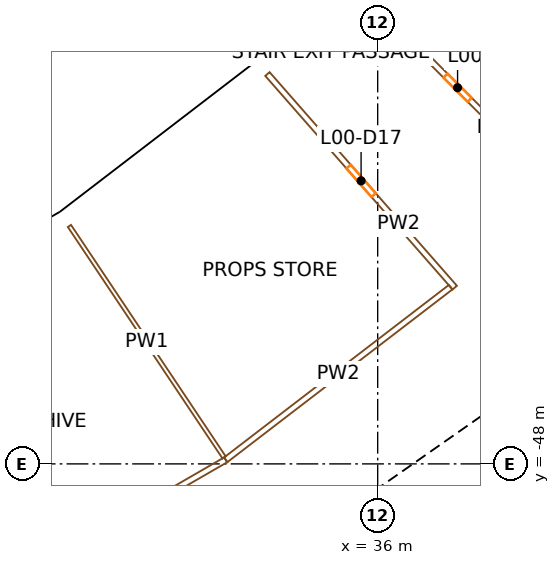
"""IFC4 building model, lengths in metres.
Left out: names, types, materials, properties, quantities, classifications, styles, units other than length and angle.
Written with IfcOpenShell. Run it as: python <this file> out.ifc"""

import sys

from ifc_helpers import new_model, si_unit, direction, frame, frame_2d, origin, origin_2d, place, context, subcontext, project, spatial, rectangle, extrude, element, fill, save


model = new_model("IFC4")
c1 = context("Model", 3, precision=1e-05, world=origin(), true_north=direction((0.0, 1.0)))
c2 = subcontext(c1, "Body", "Model", "MODEL_VIEW")
j1 = project(units=[si_unit("LENGTHUNIT", "METRE"), si_unit("PLANEANGLEUNIT", "RADIAN")], contexts=[c1])
p1 = place(None, origin())
s1 = spatial("IfcSite", under=j1, at=p1, CompositionType="ELEMENT")
p2 = place(p1, origin())
s2 = spatial("IfcBuilding", under=s1, at=p2, CompositionType="ELEMENT")
p3 = place(p2, origin())
s3 = spatial("IfcBuildingStorey", under=s2, at=p3, CompositionType="ELEMENT", Elevation=0.0)
p4 = place(p3, frame((28.195, -42.197, -0.4), z_axis=(0.0, 0.0, 1.0), x_axis=(0.831469612303, 0.55557023302, 0.0)))
e1 = element("IfcColumn", 1, at=p4, inside=s3, PredefinedType="COLUMN", context=c2, shape_type="SweptSolid", body=[
    extrude(rectangle(XDim=1.1, YDim=1.3, at=origin_2d()), origin(), (0.0, 0.0, 1.0), 9.4),
])
p5 = place(p3, frame((32.362, -48.433, -0.4), z_axis=(0.0, 0.0, 1.0), x_axis=(0.831469612303, 0.55557023302, 0.0)))
e2 = element("IfcColumn", 2, at=p5, inside=s3, PredefinedType="COLUMN", context=c2, shape_type="SweptSolid", body=[
    extrude(rectangle(XDim=1.4, YDim=1.8, at=origin_2d()), origin(), (0.0, 0.0, 1.0), 9.4),
])
p6 = place(p3, frame((33.462, -38.156, -0.4), z_axis=(0.0, 0.0, 1.0), x_axis=(0.751839807479, 0.6593458151, 0.0)))
e3 = element("IfcColumn", 3, at=p6, inside=s3, PredefinedType="COLUMN", context=c2, shape_type="SweptSolid", body=[
    extrude(rectangle(XDim=1.1, YDim=1.3, at=origin_2d()), origin(), (0.0, 0.0, 1.0), 9.4),
])
p7 = place(p3, frame((38.407, -43.795, -0.4), z_axis=(0.0, 0.0, 1.0), x_axis=(0.751839807479, 0.6593458151, 0.0)))
e4 = element("IfcColumn", 4, at=p7, inside=s3, PredefinedType="COLUMN", context=c2, shape_type="SweptSolid", body=[
    extrude(rectangle(XDim=1.4, YDim=1.8, at=origin_2d()), origin(), (0.0, 0.0, 1.0), 9.4),
])
p8 = place(p3, frame((28.854, -54.324, 0.0), z_axis=(0.0, 0.0, 1.0), x_axis=(0.819145767589, 0.573585400304, 0.0)))
e5 = element("IfcWall", 5, at=p8, inside=s3, PredefinedType="SHEAR", context=c2, shape_type="SweptSolid", body=[
    extrude(rectangle(XDim=15.045, YDim=0.9, at=frame_2d((7.523, 0.0))), origin(), (0.0, 0.0, 1.0), 8.6),
])
p9 = place(p8, frame((0.85, 0.0, 0.0)))
e6 = element("IfcOpeningElement", 6, at=p9, cuts=e5, PredefinedType="OPENING", context=c2, shape_type="SweptSolid", body=[
    extrude(rectangle(XDim=1.0, YDim=2.1, at=frame_2d((0.5, 1.05))), frame((0.0, 0.46, 0.0), z_axis=(0.0, -1.0, 0.0), x_axis=(1.0, 0.0, 0.0)), (0.0, 0.0, 1.0), 0.92),
])
p10 = place(p8, frame((3.575, 0.0, 0.0)))
e7 = element("IfcOpeningElement", 7, at=p10, cuts=e5, PredefinedType="OPENING", context=c2, shape_type="SweptSolid", body=[
    extrude(rectangle(XDim=1.0, YDim=2.1, at=frame_2d((0.5, 1.05))), frame((0.0, 0.46, 0.0), z_axis=(0.0, -1.0, 0.0), x_axis=(1.0, 0.0, 0.0)), (0.0, 0.0, 1.0), 0.92),
])
p11 = place(p8, frame((6.275, 0.0, 0.0)))
e8 = element("IfcOpeningElement", 8, at=p11, cuts=e5, PredefinedType="OPENING", context=c2, shape_type="SweptSolid", body=[
    extrude(rectangle(XDim=0.9, YDim=2.1, at=frame_2d((0.45, 1.05))), frame((0.0, 0.46, 0.0), z_axis=(0.0, -1.0, 0.0), x_axis=(1.0, 0.0, 0.0)), (0.0, 0.0, 1.0), 0.92),
])
p12 = place(p8, frame((13.495, 0.0, 0.0)))
e9 = element("IfcOpeningElement", 9, at=p12, cuts=e5, PredefinedType="OPENING", context=c2, shape_type="SweptSolid", body=[
    extrude(rectangle(XDim=1.1, YDim=2.1, at=frame_2d((0.55, 1.05))), frame((0.0, 0.46, 0.0), z_axis=(0.0, -1.0, 0.0), x_axis=(1.0, 0.0, 0.0)), (0.0, 0.0, 1.0), 0.92),
])
p13 = place(p3, frame((27.714, -41.583, 0.0), z_axis=(0.0, 0.0, 1.0), x_axis=(-0.866022817921, -0.50000447882, 0.0)))
e10 = element("IfcWall", 10, at=p13, inside=s3, PredefinedType="SOLIDWALL", context=c2, shape_type="SweptSolid", body=[
    extrude(rectangle(XDim=6.419, YDim=0.45, at=frame_2d((3.21, 0.0))), origin(), (0.0, 0.0, 1.0), 7.7),
])
p14 = place(p3, frame((32.975, -37.555, 0.0), z_axis=(0.0, 0.0, 1.0), x_axis=(-0.793338838284, -0.608780327927, 0.0)))
e11 = element("IfcWall", 11, at=p14, inside=s3, PredefinedType="SOLIDWALL", context=c2, shape_type="SweptSolid", body=[
    extrude(rectangle(XDim=6.597, YDim=0.45, at=frame_2d((3.298, 0.0))), origin(), (0.0, 0.0, 1.0), 7.7),
])
p15 = place(p14, frame((2.398, 0.0, 0.0)))
e12 = element("IfcOpeningElement", 12, at=p15, cuts=e11, PredefinedType="OPENING", context=c2, shape_type="SweptSolid", body=[
    extrude(rectangle(XDim=1.8, YDim=2.4, at=frame_2d((0.9, 1.2))), frame((0.0, 0.235, 0.0), z_axis=(0.0, -1.0, 0.0), x_axis=(1.0, 0.0, 0.0)), (0.0, 0.0, 1.0), 0.47),
])
p16 = place(p3, frame((37.532, -32.993, 0.0), z_axis=(0.0, 0.0, 1.0), x_axis=(-0.707106781187, -0.707106781187, 0.0)))
e13 = element("IfcWall", 13, at=p16, inside=s3, PredefinedType="SOLIDWALL", context=c2, shape_type="SweptSolid", body=[
    extrude(rectangle(XDim=6.419, YDim=0.45, at=frame_2d((3.209, 0.0))), origin(), (0.0, 0.0, 1.0), 7.7),
])
p17 = place(p16, frame((5.94, 0.0, 0.0), z_axis=(0.0, 0.0, 1.0), x_axis=(-1.0, 0.0, 0.0)))
e14 = element("IfcOpeningElement", 14, at=p17, cuts=e13, PredefinedType="OPENING", context=c2, shape_type="SweptSolid", body=[
    extrude(rectangle(XDim=1.2, YDim=2.4, at=frame_2d((0.6, 1.2))), frame((0.0, 0.235, 0.0), z_axis=(0.0, -1.0, 0.0), x_axis=(1.0, 0.0, 0.0)), (0.0, 0.0, 1.0), 0.47),
])
p18 = place(p3, frame((25.541, -51.622, 0.0), z_axis=(0.0, 0.0, 1.0), x_axis=(0.866020983744, 0.500007655656, 0.0)))
e15 = element("IfcWall", 15, at=p18, inside=s3, PredefinedType="PARTITIONING", context=c2, shape_type="SweptSolid", body=[
    extrude(rectangle(XDim=7.459, YDim=0.15, at=frame_2d((3.73, 0.0))), origin(), (0.0, 0.0, 1.0), 7.6),
])
p19 = place(p18, frame((3.23, 0.0, 0.0)))
e16 = element("IfcOpeningElement", 16, at=p19, cuts=e15, PredefinedType="OPENING", context=c2, shape_type="SweptSolid", body=[
    extrude(rectangle(XDim=1.0, YDim=2.1, at=frame_2d((0.5, 1.05))), frame((0.0, 0.085, 0.0), z_axis=(0.0, -1.0, 0.0), x_axis=(1.0, 0.0, 0.0)), (0.0, 0.0, 1.0), 0.17),
])
p20 = place(p3, frame((27.89, -41.74, 0.0), z_axis=(0.0, 0.0, 1.0), x_axis=(0.555569023768, -0.831470420297, 0.0)))
e17 = element("IfcWall", 17, at=p20, inside=s3, PredefinedType="PARTITIONING", context=c2, shape_type="SweptSolid", body=[
    extrude(rectangle(XDim=7.325, YDim=0.1, at=frame_2d((3.663, 0.0))), origin(), (0.0, 0.0, 1.0), 7.6),
])
p21 = place(p3, frame((32.001, -47.893, 0.0), z_axis=(0.0, 0.0, 1.0), x_axis=(0.793353438114, 0.608761301523, 0.0)))
e18 = element("IfcWall", 18, at=p21, inside=s3, PredefinedType="PARTITIONING", context=c2, shape_type="SweptSolid", body=[
    extrude(rectangle(XDim=7.459, YDim=0.15, at=frame_2d((3.73, 0.0))), origin(), (0.0, 0.0, 1.0), 7.6),
])
p22 = place(p3, frame((38.028, -43.362, 0.0), z_axis=(0.0, 0.0, 1.0), x_axis=(-0.659362039417, 0.751825578826, 0.0)))
e19 = element("IfcWall", 19, at=p22, inside=s3, PredefinedType="PARTITIONING", context=c2, shape_type="SweptSolid", body=[
    extrude(rectangle(XDim=7.475, YDim=0.15, at=frame_2d((3.737, 0.0))), origin(), (0.0, 0.0, 1.0), 7.6),
])
p23 = place(p22, frame((3.238, 0.0, 0.0)))
e20 = element("IfcOpeningElement", 20, at=p23, cuts=e19, PredefinedType="OPENING", context=c2, shape_type="SweptSolid", body=[
    extrude(rectangle(XDim=1.0, YDim=2.1, at=frame_2d((0.5, 1.05))), frame((0.0, 0.085, 0.0), z_axis=(0.0, -1.0, 0.0), x_axis=(1.0, 0.0, 0.0)), (0.0, 0.0, 1.0), 0.17),
])
p24 = place(p3, frame((35.421, -35.421, 0.0), z_axis=(0.0, 0.0, 1.0), x_axis=(0.707106781187, -0.707106781187, 0.0)))
e21 = element("IfcWall", 21, at=p24, inside=s3, PredefinedType="PARTITIONING", context=c2, shape_type="SweptSolid", body=[
    extrude(rectangle(XDim=7.582, YDim=0.15, at=frame_2d((3.791, 0.0))), origin(), (0.0, 0.0, 1.0), 7.6),
])
p25 = place(p24, frame((3.341, 0.0, 0.0)))
e22 = element("IfcOpeningElement", 22, at=p25, cuts=e21, PredefinedType="OPENING", context=c2, shape_type="SweptSolid", body=[
    extrude(rectangle(XDim=0.9, YDim=2.1, at=frame_2d((0.45, 1.05))), frame((0.0, 0.085, 0.0), z_axis=(0.0, -1.0, 0.0), x_axis=(1.0, 0.0, 0.0)), (0.0, 0.0, 1.0), 0.17),
])
p26 = place(p3, frame((37.638, -33.187, 0.0), z_axis=(0.0, 0.0, 1.0), x_axis=(0.519163683086, -0.854674833, 0.0)))
e23 = element("IfcWall", 23, at=p26, inside=s3, PredefinedType="PARTITIONING", context=c2, shape_type="SweptSolid", body=[
    extrude(rectangle(XDim=7.725, YDim=0.15, at=frame_2d((3.862, 0.0))), origin(), (0.0, 0.0, 1.0), 7.6),
])
p27 = place(p3, frame((51.367, -42.704, 0.0), z_axis=(0.0, 0.0, 1.0), x_axis=(-0.815732765415, 0.578428954521, 0.0)))
e24 = element("IfcWall", 24, at=p27, inside=s3, PredefinedType="PARTITIONING", context=c2, shape_type="SweptSolid", body=[
    extrude(rectangle(XDim=16.668, YDim=0.1, at=frame_2d((8.334, 0.0))), origin(), (0.0, 0.0, 1.0), 7.6),
])
p28 = place(p17, origin())
e25 = element("IfcDoor", 25, at=p28, inside=s3, OperationType="SINGLE_SWING_LEFT", PredefinedType="DOOR", context=c2, shape_type="SweptSolid", body=[
    extrude(rectangle(XDim=1.2, YDim=2.4, at=frame_2d((0.6, 1.2))), frame((0.0, 0.025, 0.0), z_axis=(0.0, -1.0, 0.0), x_axis=(1.0, 0.0, 0.0)), (0.0, 0.0, 1.0), 0.05),
])
fill(e14, e25)
p29 = place(p15, origin())
e26 = element("IfcDoor", 26, at=p29, inside=s3, OperationType="DOUBLE_DOOR_DOUBLE_SWING", PredefinedType="DOOR", context=c2, shape_type="SweptSolid", body=[
    extrude(rectangle(XDim=1.8, YDim=2.4, at=frame_2d((0.9, 1.2))), frame((0.0, 0.025, 0.0), z_axis=(0.0, -1.0, 0.0), x_axis=(1.0, 0.0, 0.0)), (0.0, 0.0, 1.0), 0.05),
])
fill(e12, e26)
p30 = place(p23, origin())
e27 = element("IfcDoor", 27, at=p30, inside=s3, OperationType="SINGLE_SWING_RIGHT", PredefinedType="DOOR", context=c2, shape_type="SweptSolid", body=[
    extrude(rectangle(XDim=1.0, YDim=2.1, at=frame_2d((0.5, 1.05))), frame((0.0, 0.025, 0.0), z_axis=(0.0, -1.0, 0.0), x_axis=(1.0, 0.0, 0.0)), (0.0, 0.0, 1.0), 0.05),
])
fill(e20, e27)
p31 = place(p25, origin())
e28 = element("IfcDoor", 28, at=p31, inside=s3, OperationType="SINGLE_SWING_RIGHT", PredefinedType="DOOR", context=c2, shape_type="SweptSolid", body=[
    extrude(rectangle(XDim=0.9, YDim=2.1, at=frame_2d((0.45, 1.05))), frame((0.0, 0.025, 0.0), z_axis=(0.0, -1.0, 0.0), x_axis=(1.0, 0.0, 0.0)), (0.0, 0.0, 1.0), 0.05),
])
fill(e22, e28)
save(model, sys.argv[1])
